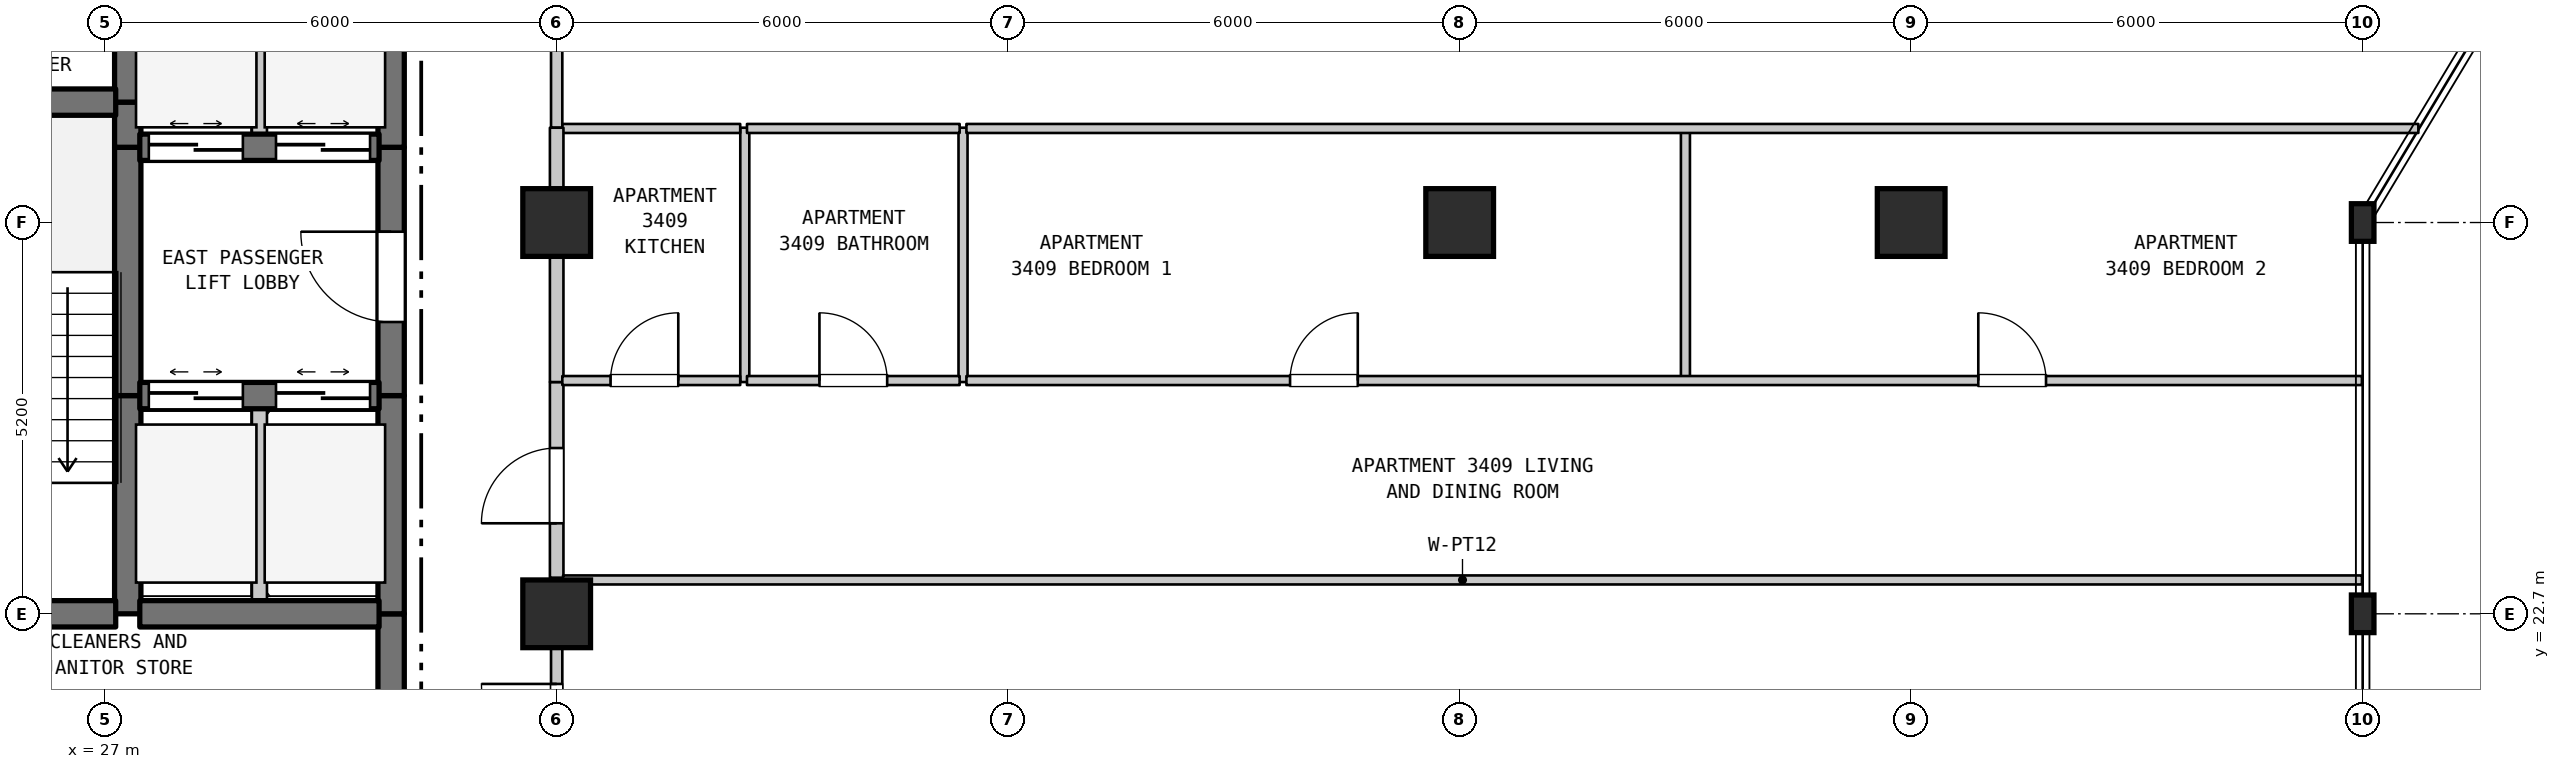
"""IFC4 building model, lengths in metres.
Left out: names, types, materials, properties, quantities, classifications, styles, units other than length and angle.
Written with IfcOpenShell. Run it as: python <this file> out.ifc"""

import sys

from ifc_helpers import new_model, si_unit, direction, frame, frame_2d, origin, origin_2d, place, context, subcontext, project, spatial, rectangle, i_section, extrude, element, fill, save


model = new_model("IFC4")
c1 = context("Model", 3, precision=1e-05, world=origin(), true_north=direction((0.0, 1.0)))
c2 = subcontext(c1, "Body", "Model", "MODEL_VIEW")
j1 = project(units=[si_unit("LENGTHUNIT", "METRE"), si_unit("PLANEANGLEUNIT", "RADIAN")], contexts=[c1])
p1 = place(None, origin())
s1 = spatial("IfcSite", under=j1, at=p1, CompositionType="ELEMENT")
p2 = place(p1, origin())
s2 = spatial("IfcBuilding", under=s1, at=p2, CompositionType="ELEMENT")
p3 = place(p2, frame((0.0, 0.0, 140.9)))
s3 = spatial("IfcBuildingStorey", under=s2, at=p3, CompositionType="ELEMENT", Elevation=140.9)
for number, where, z_axis, x_axis in (
    (1, (33.0, 22.7, 0.0), (0.0, 0.0, 1.0), (1.0, 0.0, 0.0)),
    (2, (33.0, 27.9, 0.0), (0.0, 0.0, 1.0), (1.0, 0.0, 0.0)),
    (3, (45.0, 27.9, 0.0), (0.0, 0.0, 1.0), (1.0, 0.0, 0.0)),
    (4, (51.0, 27.9, 0.0), (0.0, 0.0, 1.0), (1.0, 0.0, 0.0)),
):
    element("IfcColumn", number, at=place(p3, frame(where, z_axis=z_axis, x_axis=x_axis)), inside=s3, PredefinedType="COLUMN", context=c2, shape_type="SweptSolid", body=[
        extrude(rectangle(XDim=0.9, YDim=0.9, at=origin_2d()), origin(), (0.0, 0.0, 1.0), 3.7),
    ])
for number, where, z_axis, x_axis in (
    (5, (57.0, 22.7, 0.0), (0.0, 0.0, 1.0), (1.0, 0.0, 0.0)),
    (6, (57.0, 27.9, 0.0), (0.0, 0.0, 1.0), (1.0, 0.0, 0.0)),
):
    element("IfcColumn", number, at=place(p3, frame(where, z_axis=z_axis, x_axis=x_axis)), inside=s3, PredefinedType="COLUMN", context=c2, shape_type="SweptSolid", body=[
        extrude(i_section(OverallWidth=0.3, OverallDepth=0.5, WebThickness=0.014, FlangeThickness=0.028, FilletRadius=0.027, at=origin_2d()), origin(), (0.0, 0.0, 1.0), 3.7),
    ])
p4 = place(p3, frame((27.3, 22.7, 0.0), z_axis=(0.0, 0.0, 1.0), x_axis=(0.0, 1.0, 0.0)))
e7 = element("IfcWall", 7, at=p4, inside=s3, PredefinedType="SHEAR", context=c2, shape_type="SweptSolid", body=[
    extrude(rectangle(XDim=2.9, YDim=0.35, at=frame_2d((1.45, 0.0))), origin(), (0.0, 0.0, 1.0), 3.385),
])
p5 = place(p3, frame((27.3, 25.6, 0.0), z_axis=(0.0, 0.0, 1.0), x_axis=(0.0, 1.0, 0.0)))
e8 = element("IfcWall", 8, at=p5, inside=s3, PredefinedType="SHEAR", context=c2, shape_type="SweptSolid", body=[
    extrude(rectangle(XDim=3.3, YDim=0.35, at=frame_2d((1.65, 0.0))), origin(), (0.0, 0.0, 1.0), 3.385),
])
p6 = place(p3, frame((27.3, 28.9, 0.0), z_axis=(0.0, 0.0, 1.0), x_axis=(0.0, 1.0, 0.0)))
e9 = element("IfcWall", 9, at=p6, inside=s3, PredefinedType="SHEAR", context=c2, shape_type="SweptSolid", body=[
    extrude(rectangle(XDim=0.6, YDim=0.35, at=frame_2d((0.3, 0.0))), origin(), (0.0, 0.0, 1.0), 3.385),
])
p7 = place(p3, frame((27.3, 29.5, 0.0), z_axis=(0.0, 0.0, 1.0), x_axis=(0.0, 1.0, 0.0)))
e10 = element("IfcWall", 10, at=p7, inside=s3, PredefinedType="SHEAR", context=c2, shape_type="SweptSolid", body=[
    extrude(rectangle(XDim=2.0, YDim=0.35, at=frame_2d((1.0, 0.0))), origin(), (0.0, 0.0, 1.0), 3.385),
])
p8 = place(p3, frame((29.05, 22.7, 0.0), z_axis=(0.0, 0.0, 1.0), x_axis=(0.0, 1.0, 0.0)))
e11 = element("IfcWall", 11, at=p8, inside=s3, PredefinedType="STANDARD", context=c2, shape_type="SweptSolid", body=[
    extrude(rectangle(XDim=2.9, YDim=0.2, at=frame_2d((1.45, 0.0))), origin(), (0.0, 0.0, 1.0), 3.385),
])
p9 = place(p3, frame((29.05, 28.9, 0.0), z_axis=(0.0, 0.0, 1.0), x_axis=(0.0, 1.0, 0.0)))
e12 = element("IfcWall", 12, at=p9, inside=s3, PredefinedType="STANDARD", context=c2, shape_type="SweptSolid", body=[
    extrude(rectangle(XDim=2.6, YDim=0.2, at=frame_2d((1.3, 0.0))), origin(), (0.0, 0.0, 1.0), 3.385),
])
p10 = place(p3, frame((30.8, 19.5, 0.0), z_axis=(0.0, 0.0, 1.0), x_axis=(0.0, 1.0, 0.0)))
e13 = element("IfcWall", 13, at=p10, inside=s3, PredefinedType="SHEAR", context=c2, shape_type="SweptSolid", body=[
    extrude(rectangle(XDim=3.2, YDim=0.35, at=frame_2d((1.6, 0.0))), origin(), (0.0, 0.0, 1.0), 3.385),
])
p11 = place(p3, frame((30.8, 22.7, 0.0), z_axis=(0.0, 0.0, 1.0), x_axis=(0.0, 1.0, 0.0)))
e14 = element("IfcWall", 14, at=p11, inside=s3, PredefinedType="SHEAR", context=c2, shape_type="SweptSolid", body=[
    extrude(rectangle(XDim=2.9, YDim=0.35, at=frame_2d((1.45, 0.0))), origin(), (0.0, 0.0, 1.0), 3.385),
])
p12 = place(p3, frame((30.8, 25.6, 0.0), z_axis=(0.0, 0.0, 1.0), x_axis=(0.0, 1.0, 0.0)))
e15 = element("IfcWall", 15, at=p12, inside=s3, PredefinedType="SHEAR", context=c2, shape_type="SweptSolid", body=[
    extrude(rectangle(XDim=3.3, YDim=0.35, at=frame_2d((1.65, 0.0))), origin(), (0.0, 0.0, 1.0), 3.385),
])
p13 = place(p12, frame((0.978, 0.0, 0.0)))
e16 = element("IfcOpeningElement", 16, at=p13, cuts=e15, PredefinedType="OPENING", context=c2, shape_type="SweptSolid", body=[
    extrude(rectangle(XDim=1.2, YDim=2.2, at=frame_2d((0.6, 1.1))), frame((0.0, 0.185, 0.0), z_axis=(0.0, -1.0, 0.0), x_axis=(1.0, 0.0, 0.0)), (0.0, 0.0, 1.0), 0.37),
])
p14 = place(p3, frame((30.8, 28.9, 0.0), z_axis=(0.0, 0.0, 1.0), x_axis=(0.0, 1.0, 0.0)))
e17 = element("IfcWall", 17, at=p14, inside=s3, PredefinedType="SHEAR", context=c2, shape_type="SweptSolid", body=[
    extrude(rectangle(XDim=2.6, YDim=0.35, at=frame_2d((1.3, 0.0))), origin(), (0.0, 0.0, 1.0), 3.385),
])
p15 = place(p3, frame((33.0, 19.51, 0.0), z_axis=(0.0, 0.0, 1.0), x_axis=(0.0, 1.0, 0.0)))
e18 = element("IfcWall", 18, at=p15, inside=s3, PredefinedType="STANDARD", context=c2, shape_type="SweptSolid", body=[
    extrude(rectangle(XDim=3.66, YDim=0.15, at=frame_2d((1.83, 0.0))), origin(), (0.0, 0.0, 1.0), 2.935),
])
p16 = place(p15, frame((1.258, 0.0, 0.0)))
e19 = element("IfcOpeningElement", 19, at=p16, cuts=e18, PredefinedType="OPENING", context=c2, shape_type="SweptSolid", body=[
    extrude(rectangle(XDim=1.0, YDim=2.15, at=frame_2d((0.5, 1.075))), frame((0.0, 0.085, 0.0), z_axis=(0.0, -1.0, 0.0), x_axis=(1.0, 0.0, 0.0)), (0.0, 0.0, 1.0), 0.17),
])
p17 = place(p3, frame((33.0, 23.18, 0.0), z_axis=(0.0, 0.0, 1.0), x_axis=(0.0, 1.0, 0.0)))
e20 = element("IfcWall", 20, at=p17, inside=s3, PredefinedType="STANDARD", context=c2, shape_type="SweptSolid", body=[
    extrude(rectangle(XDim=2.6, YDim=0.18, at=frame_2d((1.3, 0.0))), origin(), (0.0, 0.0, 1.0), 2.935),
])
p18 = place(p17, frame((0.723, 0.0, 0.0)))
e21 = element("IfcOpeningElement", 21, at=p18, cuts=e20, PredefinedType="OPENING", context=c2, shape_type="SweptSolid", body=[
    extrude(rectangle(XDim=1.0, YDim=2.15, at=frame_2d((0.5, 1.075))), frame((0.0, 0.1, 0.0), z_axis=(0.0, -1.0, 0.0), x_axis=(1.0, 0.0, 0.0)), (0.0, 0.0, 1.0), 0.2),
])
p19 = place(p3, frame((33.0, 25.78, 0.0), z_axis=(0.0, 0.0, 1.0), x_axis=(0.0, 1.0, 0.0)))
e22 = element("IfcWall", 22, at=p19, inside=s3, PredefinedType="STANDARD", context=c2, shape_type="SweptSolid", body=[
    extrude(rectangle(XDim=2.12, YDim=0.18, at=frame_2d((1.06, 0.0))), origin(), (0.0, 0.0, 1.0), 2.935),
])
p20 = place(p3, frame((33.0, 29.16, 0.0), z_axis=(0.0, 0.0, 1.0), x_axis=(0.0, 1.0, 0.0)))
e23 = element("IfcWall", 23, at=p20, inside=s3, PredefinedType="STANDARD", context=c2, shape_type="SweptSolid", body=[
    extrude(rectangle(XDim=8.74, YDim=0.15, at=frame_2d((4.37, 0.0))), origin(), (0.0, 0.0, 1.0), 2.885),
])
p21 = place(p20, frame((3.799, 0.0, 0.0)))
e24 = element("IfcOpeningElement", 24, at=p21, cuts=e23, PredefinedType="OPENING", context=c2, shape_type="SweptSolid", body=[
    extrude(rectangle(XDim=1.0, YDim=2.15, at=frame_2d((0.5, 1.075))), frame((0.0, 0.085, 0.0), z_axis=(0.0, -1.0, 0.0), x_axis=(1.0, 0.0, 0.0)), (0.0, 0.0, 1.0), 0.17),
])
for number, where, z_axis, x_axis in (
    (25, (35.5, 25.78, 0.0), (0.0, 0.0, 1.0), (0.0, 1.0, 0.0)),
    (26, (38.4, 25.78, 0.0), (0.0, 0.0, 1.0), (0.0, 1.0, 0.0)),
    (27, (48.0, 25.78, 0.0), (0.0, 0.0, 1.0), (0.0, 1.0, 0.0)),
):
    element("IfcWall", number, at=place(p3, frame(where, z_axis=z_axis, x_axis=x_axis)), inside=s3, PredefinedType="PARTITIONING", context=c2, shape_type="SweptSolid", body=[
        extrude(rectangle(XDim=3.38, YDim=0.12, at=frame_2d((1.69, 0.0))), origin(), (0.0, 0.0, 1.0), 3.385),
    ])
p22 = place(p3, frame((25.985, 22.7, 0.0), z_axis=(0.0, 0.0, 1.0), x_axis=(1.0, 0.0, 0.0)))
e28 = element("IfcWall", 28, at=p22, inside=s3, PredefinedType="SHEAR", context=c2, shape_type="SweptSolid", body=[
    extrude(rectangle(XDim=1.155, YDim=0.35, at=frame_2d((0.577, 0.0))), origin(), (0.0, 0.0, 1.0), 3.385),
])
p23 = place(p3, frame((27.46, 22.7, 0.0), z_axis=(0.0, 0.0, 1.0), x_axis=(1.0, 0.0, 0.0)))
e29 = element("IfcWall", 29, at=p23, inside=s3, PredefinedType="SHEAR", context=c2, shape_type="SweptSolid", body=[
    extrude(rectangle(XDim=3.18, YDim=0.35, at=frame_2d((1.59, 0.0))), origin(), (0.0, 0.0, 1.0), 3.385),
])
p24 = place(p3, frame((33.085, 23.15, 0.0), z_axis=(0.0, 0.0, 1.0), x_axis=(1.0, 0.0, 0.0)))
e30 = element("IfcWall", 30, at=p24, inside=s3, PredefinedType="PARTITIONING", context=c2, shape_type="SweptSolid", body=[
    extrude(rectangle(XDim=23.905, YDim=0.12, at=frame_2d((11.953, 0.0))), origin(), (0.0, 0.0, 1.0), 3.385),
])
p25 = place(p3, frame((27.46, 25.6, 0.0), z_axis=(0.0, 0.0, 1.0), x_axis=(1.0, 0.0, 0.0)))
e31 = element("IfcWall", 31, at=p25, inside=s3, PredefinedType="SHEAR", context=c2, shape_type="SweptSolid", body=[
    extrude(rectangle(XDim=3.18, YDim=0.35, at=frame_2d((1.59, 0.0))), origin(), (0.0, 0.0, 1.0), 3.385),
])
p26 = place(p25, frame((0.12, 0.0, 0.0)))
e32 = element("IfcOpeningElement", 32, at=p26, cuts=e31, PredefinedType="OPENING", context=c2, shape_type="SweptSolid", body=[
    extrude(rectangle(XDim=1.25, YDim=2.2, at=frame_2d((0.625, 1.1))), frame((0.0, 0.185, 0.0), z_axis=(0.0, -1.0, 0.0), x_axis=(1.0, 0.0, 0.0)), (0.0, 0.0, 1.0), 0.37),
])
p27 = place(p25, frame((1.81, 0.0, 0.0)))
e33 = element("IfcOpeningElement", 33, at=p27, cuts=e31, PredefinedType="OPENING", context=c2, shape_type="SweptSolid", body=[
    extrude(rectangle(XDim=1.25, YDim=2.2, at=frame_2d((0.625, 1.1))), frame((0.0, 0.185, 0.0), z_axis=(0.0, -1.0, 0.0), x_axis=(1.0, 0.0, 0.0)), (0.0, 0.0, 1.0), 0.37),
])
p28 = place(p3, frame((33.075, 25.8, 0.0), z_axis=(0.0, 0.0, 1.0), x_axis=(1.0, 0.0, 0.0)))
e34 = element("IfcWall", 34, at=p28, inside=s3, PredefinedType="PARTITIONING", context=c2, shape_type="SweptSolid", body=[
    extrude(rectangle(XDim=2.364, YDim=0.12, at=frame_2d((1.182, 0.0))), origin(), (0.0, 0.0, 1.0), 3.385),
])
p29 = place(p28, frame((0.641, 0.0, 0.0)))
e35 = element("IfcOpeningElement", 35, at=p29, cuts=e34, PredefinedType="OPENING", context=c2, shape_type="SweptSolid", body=[
    extrude(rectangle(XDim=0.9, YDim=2.15, at=frame_2d((0.45, 1.075))), frame((0.0, 0.07, 0.0), z_axis=(0.0, -1.0, 0.0), x_axis=(1.0, 0.0, 0.0)), (0.0, 0.0, 1.0), 0.14),
])
p30 = place(p3, frame((35.529, 25.8, 0.0), z_axis=(0.0, 0.0, 1.0), x_axis=(1.0, 0.0, 0.0)))
e36 = element("IfcWall", 36, at=p30, inside=s3, PredefinedType="PARTITIONING", context=c2, shape_type="SweptSolid", body=[
    extrude(rectangle(XDim=2.826, YDim=0.12, at=frame_2d((1.413, 0.0))), origin(), (0.0, 0.0, 1.0), 3.385),
])
p31 = place(p30, frame((0.963, 0.0, 0.0)))
e37 = element("IfcOpeningElement", 37, at=p31, cuts=e36, PredefinedType="OPENING", context=c2, shape_type="SweptSolid", body=[
    extrude(rectangle(XDim=0.9, YDim=2.1, at=frame_2d((0.45, 1.05))), frame((0.0, 0.07, 0.0), z_axis=(0.0, -1.0, 0.0), x_axis=(1.0, 0.0, 0.0)), (0.0, 0.0, 1.0), 0.14),
])
p32 = place(p3, frame((38.445, 25.8, 0.0), z_axis=(0.0, 0.0, 1.0), x_axis=(1.0, 0.0, 0.0)))
e38 = element("IfcWall", 38, at=p32, inside=s3, PredefinedType="PARTITIONING", context=c2, shape_type="SweptSolid", body=[
    extrude(rectangle(XDim=18.545, YDim=0.12, at=frame_2d((9.272, 0.0))), origin(), (0.0, 0.0, 1.0), 3.385),
])
p33 = place(p32, frame((4.301, 0.0, 0.0)))
e39 = element("IfcOpeningElement", 39, at=p33, cuts=e38, PredefinedType="OPENING", context=c2, shape_type="SweptSolid", body=[
    extrude(rectangle(XDim=0.9, YDim=2.15, at=frame_2d((0.45, 1.075))), frame((0.0, 0.07, 0.0), z_axis=(0.0, -1.0, 0.0), x_axis=(1.0, 0.0, 0.0)), (0.0, 0.0, 1.0), 0.14),
])
p34 = place(p32, frame((13.447, 0.0, 0.0)))
e40 = element("IfcOpeningElement", 40, at=p34, cuts=e38, PredefinedType="OPENING", context=c2, shape_type="SweptSolid", body=[
    extrude(rectangle(XDim=0.9, YDim=2.15, at=frame_2d((0.45, 1.075))), frame((0.0, 0.07, 0.0), z_axis=(0.0, -1.0, 0.0), x_axis=(1.0, 0.0, 0.0)), (0.0, 0.0, 1.0), 0.14),
])
p35 = place(p3, frame((27.46, 28.9, 0.0), z_axis=(0.0, 0.0, 1.0), x_axis=(1.0, 0.0, 0.0)))
e41 = element("IfcWall", 41, at=p35, inside=s3, PredefinedType="SHEAR", context=c2, shape_type="SweptSolid", body=[
    extrude(rectangle(XDim=3.18, YDim=0.35, at=frame_2d((1.59, 0.0))), origin(), (0.0, 0.0, 1.0), 3.385),
])
p36 = place(p35, frame((0.12, 0.0, 0.0)))
e42 = element("IfcOpeningElement", 42, at=p36, cuts=e41, PredefinedType="OPENING", context=c2, shape_type="SweptSolid", body=[
    extrude(rectangle(XDim=1.25, YDim=2.2, at=frame_2d((0.625, 1.1))), frame((0.0, 0.185, 0.0), z_axis=(0.0, -1.0, 0.0), x_axis=(1.0, 0.0, 0.0)), (0.0, 0.0, 1.0), 0.37),
])
p37 = place(p35, frame((1.81, 0.0, 0.0)))
e43 = element("IfcOpeningElement", 43, at=p37, cuts=e41, PredefinedType="OPENING", context=c2, shape_type="SweptSolid", body=[
    extrude(rectangle(XDim=1.25, YDim=2.2, at=frame_2d((0.625, 1.1))), frame((0.0, 0.185, 0.0), z_axis=(0.0, -1.0, 0.0), x_axis=(1.0, 0.0, 0.0)), (0.0, 0.0, 1.0), 0.37),
])
p38 = place(p3, frame((33.075, 29.15, 0.0), z_axis=(0.0, 0.0, 1.0), x_axis=(1.0, 0.0, 0.0)))
e44 = element("IfcWall", 44, at=p38, inside=s3, PredefinedType="PARTITIONING", context=c2, shape_type="SweptSolid", body=[
    extrude(rectangle(XDim=2.364, YDim=0.12, at=frame_2d((1.182, 0.0))), origin(), (0.0, 0.0, 1.0), 3.385),
])
p39 = place(p3, frame((35.529, 29.15, 0.0), z_axis=(0.0, 0.0, 1.0), x_axis=(1.0, 0.0, 0.0)))
e45 = element("IfcWall", 45, at=p39, inside=s3, PredefinedType="PARTITIONING", context=c2, shape_type="SweptSolid", body=[
    extrude(rectangle(XDim=2.826, YDim=0.12, at=frame_2d((1.413, 0.0))), origin(), (0.0, 0.0, 1.0), 3.385),
])
p40 = place(p3, frame((38.445, 29.15, 0.0), z_axis=(0.0, 0.0, 1.0), x_axis=(1.0, 0.0, 0.0)))
e46 = element("IfcWall", 46, at=p40, inside=s3, PredefinedType="PARTITIONING", context=c2, shape_type="SweptSolid", body=[
    extrude(rectangle(XDim=19.295, YDim=0.12, at=frame_2d((9.647, 0.0))), origin(), (0.0, 0.0, 1.0), 3.385),
])
p41 = place(p3, frame((23.96, 29.5, 0.0), z_axis=(0.0, 0.0, 1.0), x_axis=(1.0, 0.0, 0.0)))
e47 = element("IfcWall", 47, at=p41, inside=s3, PredefinedType="SHEAR", context=c2, shape_type="SweptSolid", body=[
    extrude(rectangle(XDim=3.18, YDim=0.35, at=frame_2d((1.59, 0.0))), origin(), (0.0, 0.0, 1.0), 3.385),
])
p42 = place(p3, frame((33.0, 27.9, 0.0), z_axis=(0.0, 0.0, 1.0), x_axis=(0.0, 1.0, 0.0)))
e48 = element("IfcWall", 48, at=p42, inside=s3, PredefinedType="STANDARD", context=c2, shape_type="SweptSolid", body=[
    extrude(rectangle(XDim=1.26, YDim=0.18, at=frame_2d((0.63, 0.0))), origin(), (0.0, 0.0, 1.0), 2.885),
])
p43 = place(p13, origin())
e49 = element("IfcDoor", 49, at=p43, inside=s3, OperationType="SINGLE_SWING_RIGHT", PredefinedType="DOOR", context=c2, shape_type="SweptSolid", body=[
    extrude(rectangle(XDim=1.2, YDim=2.2, at=frame_2d((0.6, 1.1))), frame((0.0, 0.025, 0.0), z_axis=(0.0, -1.0, 0.0), x_axis=(1.0, 0.0, 0.0)), (0.0, 0.0, 1.0), 0.05),
])
fill(e16, e49)
p44 = place(p16, origin())
e50 = element("IfcDoor", 50, at=p44, inside=s3, OperationType="SINGLE_SWING_RIGHT", PredefinedType="DOOR", context=c2, shape_type="SweptSolid", body=[
    extrude(rectangle(XDim=1.0, YDim=2.15, at=frame_2d((0.5, 1.075))), frame((0.0, 0.025, 0.0), z_axis=(0.0, -1.0, 0.0), x_axis=(1.0, 0.0, 0.0)), (0.0, 0.0, 1.0), 0.05),
])
fill(e19, e50)
p45 = place(p18, origin())
e51 = element("IfcDoor", 51, at=p45, inside=s3, OperationType="SINGLE_SWING_LEFT", PredefinedType="DOOR", context=c2, shape_type="SweptSolid", body=[
    extrude(rectangle(XDim=1.0, YDim=2.15, at=frame_2d((0.5, 1.075))), frame((0.0, 0.025, 0.0), z_axis=(0.0, -1.0, 0.0), x_axis=(1.0, 0.0, 0.0)), (0.0, 0.0, 1.0), 0.05),
])
fill(e21, e51)
p46 = place(p26, origin())
e52 = element("IfcDoor", 52, at=p46, inside=s3, OperationType="DOUBLE_DOOR_SLIDING", PredefinedType="DOOR", context=c2, shape_type="SweptSolid", body=[
    extrude(rectangle(XDim=1.25, YDim=2.2, at=frame_2d((0.625, 1.1))), frame((0.0, 0.025, 0.0), z_axis=(0.0, -1.0, 0.0), x_axis=(1.0, 0.0, 0.0)), (0.0, 0.0, 1.0), 0.05),
])
fill(e32, e52)
p47 = place(p27, origin())
e53 = element("IfcDoor", 53, at=p47, inside=s3, OperationType="DOUBLE_DOOR_SLIDING", PredefinedType="DOOR", context=c2, shape_type="SweptSolid", body=[
    extrude(rectangle(XDim=1.25, YDim=2.2, at=frame_2d((0.625, 1.1))), frame((0.0, 0.025, 0.0), z_axis=(0.0, -1.0, 0.0), x_axis=(1.0, 0.0, 0.0)), (0.0, 0.0, 1.0), 0.05),
])
fill(e33, e53)
p48 = place(p29, origin())
e54 = element("IfcDoor", 54, at=p48, inside=s3, OperationType="SINGLE_SWING_RIGHT", PredefinedType="DOOR", context=c2, shape_type="SweptSolid", body=[
    extrude(rectangle(XDim=0.9, YDim=2.15, at=frame_2d((0.45, 1.075))), frame((0.0, 0.025, 0.0), z_axis=(0.0, -1.0, 0.0), x_axis=(1.0, 0.0, 0.0)), (0.0, 0.0, 1.0), 0.05),
])
fill(e35, e54)
p49 = place(p31, origin())
e55 = element("IfcDoor", 55, at=p49, inside=s3, OperationType="SINGLE_SWING_LEFT", PredefinedType="DOOR", context=c2, shape_type="SweptSolid", body=[
    extrude(rectangle(XDim=0.9, YDim=2.1, at=frame_2d((0.45, 1.05))), frame((0.0, 0.025, 0.0), z_axis=(0.0, -1.0, 0.0), x_axis=(1.0, 0.0, 0.0)), (0.0, 0.0, 1.0), 0.05),
])
fill(e37, e55)
p50 = place(p33, origin())
e56 = element("IfcDoor", 56, at=p50, inside=s3, OperationType="SINGLE_SWING_RIGHT", PredefinedType="DOOR", context=c2, shape_type="SweptSolid", body=[
    extrude(rectangle(XDim=0.9, YDim=2.15, at=frame_2d((0.45, 1.075))), frame((0.0, 0.025, 0.0), z_axis=(0.0, -1.0, 0.0), x_axis=(1.0, 0.0, 0.0)), (0.0, 0.0, 1.0), 0.05),
])
fill(e39, e56)
p51 = place(p34, origin())
e57 = element("IfcDoor", 57, at=p51, inside=s3, OperationType="SINGLE_SWING_LEFT", PredefinedType="DOOR", context=c2, shape_type="SweptSolid", body=[
    extrude(rectangle(XDim=0.9, YDim=2.15, at=frame_2d((0.45, 1.075))), frame((0.0, 0.025, 0.0), z_axis=(0.0, -1.0, 0.0), x_axis=(1.0, 0.0, 0.0)), (0.0, 0.0, 1.0), 0.05),
])
fill(e40, e57)
p52 = place(p36, origin())
e58 = element("IfcDoor", 58, at=p52, inside=s3, OperationType="DOUBLE_DOOR_SLIDING", PredefinedType="DOOR", context=c2, shape_type="SweptSolid", body=[
    extrude(rectangle(XDim=1.25, YDim=2.2, at=frame_2d((0.625, 1.1))), frame((0.0, 0.025, 0.0), z_axis=(0.0, -1.0, 0.0), x_axis=(1.0, 0.0, 0.0)), (0.0, 0.0, 1.0), 0.05),
])
fill(e42, e58)
p53 = place(p37, origin())
e59 = element("IfcDoor", 59, at=p53, inside=s3, OperationType="DOUBLE_DOOR_SLIDING", PredefinedType="DOOR", context=c2, shape_type="SweptSolid", body=[
    extrude(rectangle(XDim=1.25, YDim=2.2, at=frame_2d((0.625, 1.1))), frame((0.0, 0.025, 0.0), z_axis=(0.0, -1.0, 0.0), x_axis=(1.0, 0.0, 0.0)), (0.0, 0.0, 1.0), 0.05),
])
fill(e43, e59)
save(model, sys.argv[1])
